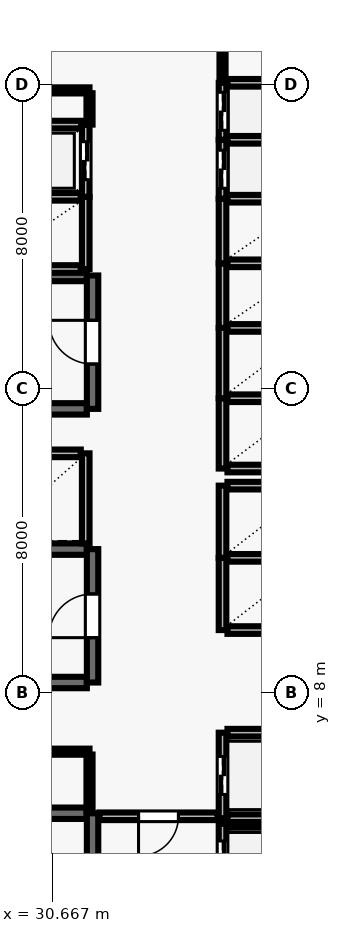
"""IFC4 building model, lengths in metres.
Left out: names, types, materials, properties, quantities, classifications, styles, units other than length and angle.
Written with IfcOpenShell. Run it as: python <this file> out.ifc"""

import sys

from ifc_helpers import new_model, si_unit, direction, frame, frame_2d, origin, place, context, subcontext, project, spatial, rectangle, extrude, element, fill, save


model = new_model("IFC4")
c1 = context("Model", 3, precision=1e-05, world=origin(), true_north=direction((0.0, 1.0)))
c2 = subcontext(c1, "Body", "Model", "MODEL_VIEW")
j1 = project(units=[si_unit("LENGTHUNIT", "METRE"), si_unit("PLANEANGLEUNIT", "RADIAN")], contexts=[c1])
p1 = place(None, origin())
s1 = spatial("IfcSite", under=j1, at=p1, CompositionType="ELEMENT")
p2 = place(p1, origin())
s2 = spatial("IfcBuilding", under=s1, at=p2, CompositionType="ELEMENT")
p3 = place(p2, frame((0.0, 0.0, 89.5)))
s3 = spatial("IfcBuildingStorey", under=s2, at=p3, CompositionType="ELEMENT", Elevation=89.5)
p4 = place(p3, frame((31.58, 4.83, 0.0), z_axis=(0.0, 0.0, 1.0), x_axis=(-1.0, 0.0, 0.0)))
e1 = element("IfcWall", 1, at=p4, inside=s3, PredefinedType="SHEAR", context=c2, shape_type="SweptSolid", body=[
    extrude(rectangle(XDim=8.36, YDim=0.3, at=frame_2d((4.18, 0.0))), origin(), (0.0, 0.0, 1.0), 3.64),
])
p5 = place(p3, frame((31.73, 0.96, 0.0), z_axis=(0.0, 0.0, 1.0), x_axis=(0.0, 1.0, 0.0)))
e2 = element("IfcWall", 2, at=p5, inside=s3, PredefinedType="SHEAR", context=c2, shape_type="SweptSolid", body=[
    extrude(rectangle(XDim=3.87, YDim=0.3, at=frame_2d((1.935, 0.0))), origin(), (0.0, 0.0, 1.0), 3.64),
])
p6 = place(p5, frame((1.54, 0.0, 0.0)))
e3 = element("IfcOpeningElement", 3, at=p6, cuts=e2, PredefinedType="OPENING", context=c2, shape_type="SweptSolid", body=[
    extrude(rectangle(XDim=1.15, YDim=2.15, at=frame_2d((0.575, 1.075))), frame((0.0, 0.16, 0.0), z_axis=(0.0, -1.0, 0.0), x_axis=(1.0, 0.0, 0.0)), (0.0, 0.0, 1.0), 0.32),
])
for number, where, z_axis, x_axis in (
    (4, (31.58, 18.98, 0.0), (0.0, 0.0, 1.0), (-1.0, 0.0, 0.0)),
    (5, (23.22, 15.47, 0.0), (0.0, 0.0, 1.0), (1.0, 0.0, 0.0)),
):
    element("IfcWall", number, at=place(p3, frame(where, z_axis=z_axis, x_axis=x_axis)), inside=s3, PredefinedType="SHEAR", context=c2, shape_type="SweptSolid", body=[
        extrude(rectangle(XDim=8.36, YDim=0.3, at=frame_2d((4.18, 0.0))), origin(), (0.0, 0.0, 1.0), 3.64),
    ])
p7 = place(p3, frame((31.73, 15.47, 0.0), z_axis=(0.0, 0.0, 1.0), x_axis=(0.0, 1.0, 0.0)))
e6 = element("IfcWall", 6, at=p7, inside=s3, PredefinedType="SHEAR", context=c2, shape_type="SweptSolid", body=[
    extrude(rectangle(XDim=3.51, YDim=0.3, at=frame_2d((1.755, 0.0))), origin(), (0.0, 0.0, 1.0), 3.64),
])
p8 = place(p7, frame((1.18, 0.0, 0.0)))
e7 = element("IfcOpeningElement", 7, at=p8, cuts=e6, PredefinedType="OPENING", context=c2, shape_type="SweptSolid", body=[
    extrude(rectangle(XDim=1.15, YDim=2.15, at=frame_2d((0.575, 1.075))), frame((0.0, 0.16, 0.0), z_axis=(0.0, -1.0, 0.0), x_axis=(1.0, 0.0, 0.0)), (0.0, 0.0, 1.0), 0.32),
])
for number, where, z_axis, x_axis in (
    (8, (31.58, 11.78, 0.0), (0.0, 0.0, 1.0), (-1.0, 0.0, 0.0)),
    (9, (23.22, 8.27, 0.0), (0.0, 0.0, 1.0), (1.0, 0.0, 0.0)),
):
    element("IfcWall", number, at=place(p3, frame(where, z_axis=z_axis, x_axis=x_axis)), inside=s3, PredefinedType="SHEAR", context=c2, shape_type="SweptSolid", body=[
        extrude(rectangle(XDim=8.36, YDim=0.3, at=frame_2d((4.18, 0.0))), origin(), (0.0, 0.0, 1.0), 3.64),
    ])
p9 = place(p3, frame((31.73, 8.27, 0.0), z_axis=(0.0, 0.0, 1.0), x_axis=(0.0, 1.0, 0.0)))
e10 = element("IfcWall", 10, at=p9, inside=s3, PredefinedType="SHEAR", context=c2, shape_type="SweptSolid", body=[
    extrude(rectangle(XDim=3.51, YDim=0.3, at=frame_2d((1.755, 0.0))), origin(), (0.0, 0.0, 1.0), 3.64),
])
p10 = place(p9, frame((1.18, 0.0, 0.0)))
e11 = element("IfcOpeningElement", 11, at=p10, cuts=e10, PredefinedType="OPENING", context=c2, shape_type="SweptSolid", body=[
    extrude(rectangle(XDim=1.15, YDim=2.15, at=frame_2d((0.575, 1.075))), frame((0.0, 0.16, 0.0), z_axis=(0.0, -1.0, 0.0), x_axis=(1.0, 0.0, 0.0)), (0.0, 0.0, 1.0), 0.32),
])
p11 = place(p3, frame((35.15, 4.55, 0.0), z_axis=(0.0, 0.0, 1.0), x_axis=(0.0, -1.0, 0.0)))
e12 = element("IfcWall", 12, at=p11, inside=s3, PredefinedType="SOLIDWALL", context=c2, shape_type="SweptSolid", body=[
    extrude(rectangle(XDim=2.1, YDim=0.2, at=frame_2d((1.05, 0.0))), origin(), (0.0, 0.0, 1.0), 3.64),
])
p12 = place(p11, frame((0.45, 0.0, 0.0)))
e13 = element("IfcOpeningElement", 13, at=p12, cuts=e12, PredefinedType="OPENING", context=c2, shape_type="SweptSolid", body=[
    extrude(rectangle(XDim=1.2, YDim=2.15, at=frame_2d((0.6, 1.075))), frame((0.0, 0.11, 0.0), z_axis=(0.0, -1.0, 0.0), x_axis=(1.0, 0.0, 0.0)), (0.0, 0.0, 1.0), 0.22),
])
p13 = place(p3, frame((37.42, 4.55, 0.0), z_axis=(0.0, 0.0, 1.0), x_axis=(-1.0, 0.0, 0.0)))
e14 = element("IfcWall", 14, at=p13, inside=s3, PredefinedType="SOLIDWALL", context=c2, shape_type="SweptSolid", body=[
    extrude(rectangle(XDim=2.14, YDim=0.2, at=frame_2d((1.07, 0.0))), origin(), (0.0, 0.0, 1.0), 3.64),
])
p14 = place(p3, frame((35.15, 6.95, 0.0), z_axis=(0.0, 0.0, 1.0), x_axis=(0.0, -1.0, 0.0)))
e15 = element("IfcWall", 15, at=p14, inside=s3, PredefinedType="SOLIDWALL", context=c2, shape_type="SweptSolid", body=[
    extrude(rectangle(XDim=2.25, YDim=0.2, at=frame_2d((1.125, 0.0))), origin(), (0.0, 0.0, 1.0), 3.64),
])
p15 = place(p14, frame((0.625, 0.0, 0.0)))
e16 = element("IfcOpeningElement", 16, at=p15, cuts=e15, PredefinedType="OPENING", context=c2, shape_type="SweptSolid", body=[
    extrude(rectangle(XDim=1.0, YDim=2.1, at=frame_2d((0.5, 1.05))), frame((0.0, 0.11, 0.0), z_axis=(0.0, -1.0, 0.0), x_axis=(1.0, 0.0, 0.0)), (0.0, 0.0, 1.0), 0.22),
])
for number, where, z_axis, x_axis in (
    (17, (35.28, 4.7, 0.0), (0.0, 0.0, 1.0), (1.0, 0.0, 0.0)),
    (18, (37.42, 6.95, 0.0), (0.0, 0.0, 1.0), (-1.0, 0.0, 0.0)),
):
    element("IfcWall", number, at=place(p3, frame(where, z_axis=z_axis, x_axis=x_axis)), inside=s3, PredefinedType="SOLIDWALL", context=c2, shape_type="SweptSolid", body=[
        extrude(rectangle(XDim=2.14, YDim=0.2, at=frame_2d((1.07, 0.0))), origin(), (0.0, 0.0, 1.0), 3.64),
    ])
p16 = place(p3, frame((35.15, 11.55, 0.0), z_axis=(0.0, 0.0, 1.0), x_axis=(0.0, -1.0, 0.0)))
e19 = element("IfcWall", 19, at=p16, inside=s3, PredefinedType="SOLIDWALL", context=c2, shape_type="SweptSolid", body=[
    extrude(rectangle(XDim=1.9, YDim=0.2, at=frame_2d((0.95, 0.0))), origin(), (0.0, 0.0, 1.0), 3.64),
])
for number, where, z_axis, x_axis in (
    (20, (35.28, 9.65, 0.0), (0.0, 0.0, 1.0), (1.0, 0.0, 0.0)),
    (21, (37.42, 11.55, 0.0), (0.0, 0.0, 1.0), (-1.0, 0.0, 0.0)),
):
    element("IfcWall", number, at=place(p3, frame(where, z_axis=z_axis, x_axis=x_axis)), inside=s3, PredefinedType="SOLIDWALL", context=c2, shape_type="SweptSolid", body=[
        extrude(rectangle(XDim=2.14, YDim=0.2, at=frame_2d((1.07, 0.0))), origin(), (0.0, 0.0, 1.0), 3.64),
    ])
p17 = place(p3, frame((35.15, 13.45, 0.0), z_axis=(0.0, 0.0, 1.0), x_axis=(0.0, -1.0, 0.0)))
e22 = element("IfcWall", 22, at=p17, inside=s3, PredefinedType="SOLIDWALL", context=c2, shape_type="SweptSolid", body=[
    extrude(rectangle(XDim=1.9, YDim=0.2, at=frame_2d((0.95, 0.0))), origin(), (0.0, 0.0, 1.0), 3.64),
])
p18 = place(p3, frame((37.42, 13.45, 0.0), z_axis=(0.0, 0.0, 1.0), x_axis=(-1.0, 0.0, 0.0)))
e23 = element("IfcWall", 23, at=p18, inside=s3, PredefinedType="SOLIDWALL", context=c2, shape_type="SweptSolid", body=[
    extrude(rectangle(XDim=2.14, YDim=0.2, at=frame_2d((1.07, 0.0))), origin(), (0.0, 0.0, 1.0), 3.64),
])
p19 = place(p3, frame((31.55, 11.93, 0.0), z_axis=(0.0, 0.0, 1.0), x_axis=(0.0, 1.0, 0.0)))
e24 = element("IfcWall", 24, at=p19, inside=s3, PredefinedType="SOLIDWALL", context=c2, shape_type="SweptSolid", body=[
    extrude(rectangle(XDim=2.37, YDim=0.2, at=frame_2d((1.185, 0.0))), origin(), (0.0, 0.0, 1.0), 3.64),
])
p20 = place(p3, frame((31.42, 14.3, 0.0), z_axis=(0.0, 0.0, 1.0), x_axis=(-1.0, 0.0, 0.0)))
e25 = element("IfcWall", 25, at=p20, inside=s3, PredefinedType="SOLIDWALL", context=c2, shape_type="SweptSolid", body=[
    extrude(rectangle(XDim=2.44, YDim=0.2, at=frame_2d((1.22, 0.0))), origin(), (0.0, 0.0, 1.0), 3.64),
])
p21 = place(p3, frame((35.15, 15.75, 0.0), z_axis=(0.0, 0.0, 1.0), x_axis=(0.0, -1.0, 0.0)))
e26 = element("IfcWall", 26, at=p21, inside=s3, PredefinedType="SOLIDWALL", context=c2, shape_type="SweptSolid", body=[
    extrude(rectangle(XDim=1.85, YDim=0.2, at=frame_2d((0.925, 0.0))), origin(), (0.0, 0.0, 1.0), 3.64),
])
for number, where, z_axis, x_axis in (
    (27, (35.28, 13.9, 0.0), (0.0, 0.0, 1.0), (1.0, 0.0, 0.0)),
    (28, (37.42, 15.75, 0.0), (0.0, 0.0, 1.0), (-1.0, 0.0, 0.0)),
):
    element("IfcWall", number, at=place(p3, frame(where, z_axis=z_axis, x_axis=x_axis)), inside=s3, PredefinedType="SOLIDWALL", context=c2, shape_type="SweptSolid", body=[
        extrude(rectangle(XDim=2.14, YDim=0.2, at=frame_2d((1.07, 0.0))), origin(), (0.0, 0.0, 1.0), 3.64),
    ])
p22 = place(p3, frame((35.15, 17.6, 0.0), z_axis=(0.0, 0.0, 1.0), x_axis=(0.0, -1.0, 0.0)))
e29 = element("IfcWall", 29, at=p22, inside=s3, PredefinedType="SOLIDWALL", context=c2, shape_type="SweptSolid", body=[
    extrude(rectangle(XDim=1.85, YDim=0.2, at=frame_2d((0.925, 0.0))), origin(), (0.0, 0.0, 1.0), 3.64),
])
p23 = place(p3, frame((37.42, 17.6, 0.0), z_axis=(0.0, 0.0, 1.0), x_axis=(-1.0, 0.0, 0.0)))
e30 = element("IfcWall", 30, at=p23, inside=s3, PredefinedType="SOLIDWALL", context=c2, shape_type="SweptSolid", body=[
    extrude(rectangle(XDim=2.14, YDim=0.2, at=frame_2d((1.07, 0.0))), origin(), (0.0, 0.0, 1.0), 3.64),
])
p24 = place(p3, frame((35.15, 19.3, 0.0), z_axis=(0.0, 0.0, 1.0), x_axis=(0.0, -1.0, 0.0)))
e31 = element("IfcWall", 31, at=p24, inside=s3, PredefinedType="SOLIDWALL", context=c2, shape_type="SweptSolid", body=[
    extrude(rectangle(XDim=1.7, YDim=0.2, at=frame_2d((0.85, 0.0))), origin(), (0.0, 0.0, 1.0), 3.64),
])
p25 = place(p3, frame((37.42, 19.3, 0.0), z_axis=(0.0, 0.0, 1.0), x_axis=(-1.0, 0.0, 0.0)))
e32 = element("IfcWall", 32, at=p25, inside=s3, PredefinedType="SOLIDWALL", context=c2, shape_type="SweptSolid", body=[
    extrude(rectangle(XDim=2.14, YDim=0.2, at=frame_2d((1.07, 0.0))), origin(), (0.0, 0.0, 1.0), 3.64),
])
p26 = place(p3, frame((35.15, 21.0, 0.0), z_axis=(0.0, 0.0, 1.0), x_axis=(0.0, -1.0, 0.0)))
e33 = element("IfcWall", 33, at=p26, inside=s3, PredefinedType="SOLIDWALL", context=c2, shape_type="SweptSolid", body=[
    extrude(rectangle(XDim=1.7, YDim=0.2, at=frame_2d((0.85, 0.0))), origin(), (0.0, 0.0, 1.0), 3.64),
])
p27 = place(p3, frame((37.42, 21.0, 0.0), z_axis=(0.0, 0.0, 1.0), x_axis=(-1.0, 0.0, 0.0)))
e34 = element("IfcWall", 34, at=p27, inside=s3, PredefinedType="SOLIDWALL", context=c2, shape_type="SweptSolid", body=[
    extrude(rectangle(XDim=2.14, YDim=0.2, at=frame_2d((1.07, 0.0))), origin(), (0.0, 0.0, 1.0), 3.64),
])
p28 = place(p3, frame((31.55, 19.15, 0.0), z_axis=(0.0, 0.0, 1.0), x_axis=(0.0, 1.0, 0.0)))
e35 = element("IfcWall", 35, at=p28, inside=s3, PredefinedType="SOLIDWALL", context=c2, shape_type="SweptSolid", body=[
    extrude(rectangle(XDim=1.9, YDim=0.2, at=frame_2d((0.95, 0.0))), origin(), (0.0, 0.0, 1.0), 3.64),
])
for number, where, z_axis, x_axis in (
    (36, (28.98, 19.15, 0.0), (0.0, 0.0, 1.0), (1.0, 0.0, 0.0)),
    (37, (31.42, 21.05, 0.0), (0.0, 0.0, 1.0), (-1.0, 0.0, 0.0)),
):
    element("IfcWall", number, at=place(p3, frame(where, z_axis=z_axis, x_axis=x_axis)), inside=s3, PredefinedType="SOLIDWALL", context=c2, shape_type="SweptSolid", body=[
        extrude(rectangle(XDim=2.44, YDim=0.2, at=frame_2d((1.22, 0.0))), origin(), (0.0, 0.0, 1.0), 3.64),
    ])
p29 = place(p3, frame((35.15, 22.55, 0.0), z_axis=(0.0, 0.0, 1.0), x_axis=(0.0, -1.0, 0.0)))
e38 = element("IfcWall", 38, at=p29, inside=s3, PredefinedType="SOLIDWALL", context=c2, shape_type="SweptSolid", body=[
    extrude(rectangle(XDim=1.55, YDim=0.2, at=frame_2d((0.775, 0.0))), origin(), (0.0, 0.0, 1.0), 3.64),
])
p30 = place(p29, frame((0.275, 0.0, 0.0)))
e39 = element("IfcOpeningElement", 39, at=p30, cuts=e38, PredefinedType="OPENING", context=c2, shape_type="SweptSolid", body=[
    extrude(rectangle(XDim=1.0, YDim=2.1, at=frame_2d((0.5, 1.05))), frame((0.0, 0.11, 0.0), z_axis=(0.0, -1.0, 0.0), x_axis=(1.0, 0.0, 0.0)), (0.0, 0.0, 1.0), 0.22),
])
p31 = place(p3, frame((37.42, 22.55, 0.0), z_axis=(0.0, 0.0, 1.0), x_axis=(-1.0, 0.0, 0.0)))
e40 = element("IfcWall", 40, at=p31, inside=s3, PredefinedType="SOLIDWALL", context=c2, shape_type="SweptSolid", body=[
    extrude(rectangle(XDim=2.14, YDim=0.2, at=frame_2d((1.07, 0.0))), origin(), (0.0, 0.0, 1.0), 3.64),
])
p32 = place(p3, frame((35.15, 24.05, 0.0), z_axis=(0.0, 0.0, 1.0), x_axis=(0.0, -1.0, 0.0)))
e41 = element("IfcWall", 41, at=p32, inside=s3, PredefinedType="SOLIDWALL", context=c2, shape_type="SweptSolid", body=[
    extrude(rectangle(XDim=1.5, YDim=0.2, at=frame_2d((0.75, 0.0))), origin(), (0.0, 0.0, 1.0), 3.64),
])
p33 = place(p32, frame((0.25, 0.0, 0.0)))
e42 = element("IfcOpeningElement", 42, at=p33, cuts=e41, PredefinedType="OPENING", context=c2, shape_type="SweptSolid", body=[
    extrude(rectangle(XDim=1.0, YDim=2.1, at=frame_2d((0.5, 1.05))), frame((0.0, 0.11, 0.0), z_axis=(0.0, -1.0, 0.0), x_axis=(1.0, 0.0, 0.0)), (0.0, 0.0, 1.0), 0.22),
])
p34 = place(p3, frame((37.42, 24.05, 0.0), z_axis=(0.0, 0.0, 1.0), x_axis=(-1.0, 0.0, 0.0)))
e43 = element("IfcWall", 43, at=p34, inside=s3, PredefinedType="SOLIDWALL", context=c2, shape_type="SweptSolid", body=[
    extrude(rectangle(XDim=2.14, YDim=0.2, at=frame_2d((1.07, 0.0))), origin(), (0.0, 0.0, 1.0), 3.64),
])
p35 = place(p3, frame((31.55, 21.05, 0.0), z_axis=(0.0, 0.0, 1.0), x_axis=(0.0, 1.0, 0.0)))
e44 = element("IfcWall", 44, at=p35, inside=s3, PredefinedType="SOLIDWALL", context=c2, shape_type="SweptSolid", body=[
    extrude(rectangle(XDim=1.9, YDim=0.2, at=frame_2d((0.95, 0.0))), origin(), (0.0, 0.0, 1.0), 3.64),
])
p36 = place(p35, frame((0.45, 0.0, 0.0)))
e45 = element("IfcOpeningElement", 45, at=p36, cuts=e44, PredefinedType="OPENING", context=c2, shape_type="SweptSolid", body=[
    extrude(rectangle(XDim=1.0, YDim=2.1, at=frame_2d((0.5, 1.05))), frame((0.0, 0.11, 0.0), z_axis=(0.0, -1.0, 0.0), x_axis=(1.0, 0.0, 0.0)), (0.0, 0.0, 1.0), 0.22),
])
p37 = place(p3, frame((31.43, 22.95, 0.0), z_axis=(0.0, 0.0, 1.0), x_axis=(-1.0, 0.0, 0.0)))
e46 = element("IfcWall", 46, at=p37, inside=s3, PredefinedType="SOLIDWALL", context=c2, shape_type="SweptSolid", body=[
    extrude(rectangle(XDim=2.46, YDim=0.2, at=frame_2d((1.23, 0.0))), origin(), (0.0, 0.0, 1.0), 3.64),
])
p38 = place(p3, frame((28.55, 6.45, 0.0), z_axis=(0.0, 0.0, 1.0), x_axis=(1.0, 0.0, 0.0)))
e47 = element("IfcWall", 47, at=p38, inside=s3, PredefinedType="PARTITIONING", context=c2, shape_type="SweptSolid", body=[
    extrude(rectangle(XDim=3.1, YDim=0.16, at=frame_2d((1.55, 0.0))), origin(), (0.0, 0.0, 1.0), 3.64),
])
p39 = place(p38, frame((1.11, 0.0, 0.0)))
e48 = element("IfcOpeningElement", 48, at=p39, cuts=e47, PredefinedType="OPENING", context=c2, shape_type="SweptSolid", body=[
    extrude(rectangle(XDim=0.88, YDim=2.1, at=frame_2d((0.44, 1.05))), frame((0.0, 0.09, 0.0), z_axis=(0.0, -1.0, 0.0), x_axis=(1.0, 0.0, 0.0)), (0.0, 0.0, 1.0), 0.18),
])
p40 = place(p3, frame((28.8, 23.85, 0.0), z_axis=(0.0, 0.0, 1.0), x_axis=(1.0, 0.0, 0.0)))
e49 = element("IfcWall", 49, at=p40, inside=s3, PredefinedType="PARTITIONING", context=c2, shape_type="SweptSolid", body=[
    extrude(rectangle(XDim=2.85, YDim=0.16, at=frame_2d((1.425, 0.0))), origin(), (0.0, 0.0, 1.0), 3.64),
])
p41 = place(p3, frame((35.02, 4.75, 0.0), z_axis=(0.0, 0.0, 1.0), x_axis=(-1.0, 0.0, 0.0)))
e50 = element("IfcWall", 50, at=p41, inside=s3, PredefinedType="SOLIDWALL", context=c2, shape_type="SweptSolid", body=[
    extrude(rectangle(XDim=3.11, YDim=0.2, at=frame_2d((1.555, 0.0))), origin(), (0.0, 0.0, 1.0), 3.64),
])
p42 = place(p41, frame((1.03, 0.0, 0.0)))
e51 = element("IfcOpeningElement", 51, at=p42, cuts=e50, PredefinedType="OPENING", context=c2, shape_type="SweptSolid", body=[
    extrude(rectangle(XDim=1.05, YDim=2.15, at=frame_2d((0.525, 1.075))), frame((0.0, 0.11, 0.0), z_axis=(0.0, -1.0, 0.0), x_axis=(1.0, 0.0, 0.0)), (0.0, 0.0, 1.0), 0.22),
])
p43 = place(p3, frame((31.65, 4.86, 0.0), z_axis=(0.0, 0.0, 1.0), x_axis=(0.0, 1.0, 0.0)))
e52 = element("IfcWall", 52, at=p43, inside=s3, PredefinedType="PARTITIONING", context=c2, shape_type="SweptSolid", body=[
    extrude(rectangle(XDim=1.515, YDim=0.16, at=frame_2d((0.757, 0.0))), origin(), (0.0, 0.0, 1.0), 3.64),
])
p44 = place(p3, frame((31.65, 23.775, 0.0), z_axis=(0.0, 0.0, 1.0), x_axis=(0.0, -1.0, 0.0)))
e53 = element("IfcWall", 53, at=p44, inside=s3, PredefinedType="PARTITIONING", context=c2, shape_type="SweptSolid", body=[
    extrude(rectangle(XDim=0.825, YDim=0.16, at=frame_2d((0.413, 0.0))), origin(), (0.0, 0.0, 1.0), 3.64),
])
p45 = place(p3, frame((35.15, 24.07, 0.0), z_axis=(0.0, 0.0, 1.0), x_axis=(0.0, 1.0, 0.0)))
e54 = element("IfcWall", 54, at=p45, inside=s3, PredefinedType="PARTITIONING", context=c2, shape_type="SweptSolid", body=[
    extrude(rectangle(XDim=1.855, YDim=0.16, at=frame_2d((0.927, 0.0))), origin(), (0.0, 0.0, 1.0), 3.64),
])
p46 = place(p8, origin())
e55 = element("IfcDoor", 55, at=p46, inside=s3, OperationType="SINGLE_SWING_RIGHT", PredefinedType="DOOR", context=c2, shape_type="SweptSolid", body=[
    extrude(rectangle(XDim=1.15, YDim=2.15, at=frame_2d((0.575, 1.075))), frame((0.0, 0.025, 0.0), z_axis=(0.0, -1.0, 0.0), x_axis=(1.0, 0.0, 0.0)), (0.0, 0.0, 1.0), 0.05),
])
fill(e7, e55)
p47 = place(p10, origin())
e56 = element("IfcDoor", 56, at=p47, inside=s3, OperationType="SINGLE_SWING_LEFT", PredefinedType="DOOR", context=c2, shape_type="SweptSolid", body=[
    extrude(rectangle(XDim=1.15, YDim=2.15, at=frame_2d((0.575, 1.075))), frame((0.0, 0.025, 0.0), z_axis=(0.0, -1.0, 0.0), x_axis=(1.0, 0.0, 0.0)), (0.0, 0.0, 1.0), 0.05),
])
fill(e11, e56)
p48 = place(p12, origin())
e57 = element("IfcDoor", 57, at=p48, inside=s3, OperationType="DOUBLE_DOOR_SLIDING", PredefinedType="DOOR", context=c2, shape_type="SweptSolid", body=[
    extrude(rectangle(XDim=1.2, YDim=2.15, at=frame_2d((0.6, 1.075))), frame((0.0, 0.025, 0.0), z_axis=(0.0, -1.0, 0.0), x_axis=(1.0, 0.0, 0.0)), (0.0, 0.0, 1.0), 0.05),
])
fill(e13, e57)
p49 = place(p15, origin())
e58 = element("IfcDoor", 58, at=p49, inside=s3, OperationType="DOUBLE_DOOR_SLIDING", PredefinedType="DOOR", context=c2, shape_type="SweptSolid", body=[
    extrude(rectangle(XDim=1.0, YDim=2.1, at=frame_2d((0.5, 1.05))), frame((0.0, 0.025, 0.0), z_axis=(0.0, -1.0, 0.0), x_axis=(1.0, 0.0, 0.0)), (0.0, 0.0, 1.0), 0.05),
])
fill(e16, e58)
p50 = place(p30, origin())
e59 = element("IfcDoor", 59, at=p50, inside=s3, OperationType="DOUBLE_DOOR_SLIDING", PredefinedType="DOOR", context=c2, shape_type="SweptSolid", body=[
    extrude(rectangle(XDim=1.0, YDim=2.1, at=frame_2d((0.5, 1.05))), frame((0.0, 0.025, 0.0), z_axis=(0.0, -1.0, 0.0), x_axis=(1.0, 0.0, 0.0)), (0.0, 0.0, 1.0), 0.05),
])
fill(e39, e59)
p51 = place(p33, origin())
e60 = element("IfcDoor", 60, at=p51, inside=s3, OperationType="DOUBLE_DOOR_SLIDING", PredefinedType="DOOR", context=c2, shape_type="SweptSolid", body=[
    extrude(rectangle(XDim=1.0, YDim=2.1, at=frame_2d((0.5, 1.05))), frame((0.0, 0.025, 0.0), z_axis=(0.0, -1.0, 0.0), x_axis=(1.0, 0.0, 0.0)), (0.0, 0.0, 1.0), 0.05),
])
fill(e42, e60)
p52 = place(p36, origin())
e61 = element("IfcDoor", 61, at=p52, inside=s3, OperationType="DOUBLE_DOOR_SLIDING", PredefinedType="DOOR", context=c2, shape_type="SweptSolid", body=[
    extrude(rectangle(XDim=1.0, YDim=2.1, at=frame_2d((0.5, 1.05))), frame((0.0, 0.025, 0.0), z_axis=(0.0, -1.0, 0.0), x_axis=(1.0, 0.0, 0.0)), (0.0, 0.0, 1.0), 0.05),
])
fill(e45, e61)
p53 = place(p42, origin())
e62 = element("IfcDoor", 62, at=p53, inside=s3, OperationType="SINGLE_SWING_RIGHT", PredefinedType="DOOR", context=c2, shape_type="SweptSolid", body=[
    extrude(rectangle(XDim=1.05, YDim=2.15, at=frame_2d((0.525, 1.075))), frame((0.0, 0.025, 0.0), z_axis=(0.0, -1.0, 0.0), x_axis=(1.0, 0.0, 0.0)), (0.0, 0.0, 1.0), 0.05),
])
fill(e51, e62)
save(model, sys.argv[1])
